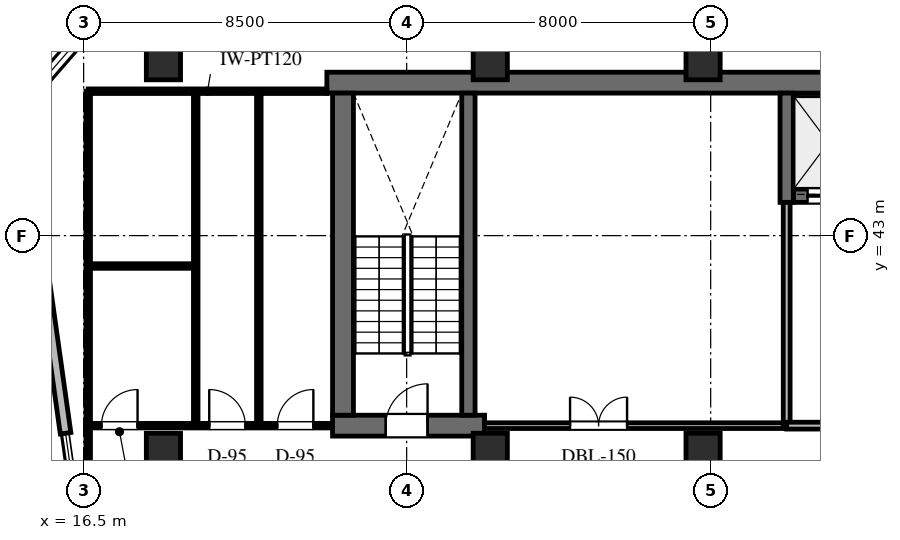
"""IFC4 building model, lengths in metres.
Left out: names, types, materials, properties, quantities, classifications, styles, units other than length and angle.
Written with IfcOpenShell. Run it as: python <this file> out.ifc"""

import sys

from ifc_helpers import new_model, si_unit, direction, frame, frame_2d, origin, origin_2d, place, context, subcontext, project, spatial, rectangle, extrude, element, fill, save


model = new_model("IFC4")
c1 = context("Model", 3, precision=1e-05, world=origin(), true_north=direction((0.0, 1.0)))
c2 = subcontext(c1, "Body", "Model", "MODEL_VIEW")
j1 = project(units=[si_unit("LENGTHUNIT", "METRE"), si_unit("PLANEANGLEUNIT", "RADIAN")], contexts=[c1])
p1 = place(None, origin())
s1 = spatial("IfcSite", under=j1, at=p1, CompositionType="ELEMENT")
p2 = place(p1, origin())
s2 = spatial("IfcBuilding", under=s1, at=p2, CompositionType="ELEMENT")
p3 = place(p2, frame((0.0, 0.0, 180.5)))
s3 = spatial("IfcBuildingStorey", under=s2, at=p3, CompositionType="ELEMENT", Elevation=180.5)
p4 = place(p3, frame((22.9, 47.025, 0.0), z_axis=(0.0, 0.0, 1.0), x_axis=(1.0, 0.0, 0.0)))
e1 = element("IfcWall", 1, at=p4, inside=s3, PredefinedType="SHEAR", context=c2, shape_type="SweptSolid", body=[
    extrude(rectangle(XDim=43.5, YDim=0.55, at=frame_2d((21.75, 0.0))), origin(), (0.0, 0.0, 1.0), 4.0),
])
p5 = place(p3, frame((35.175, 44.05, 0.0), z_axis=(0.0, 0.0, 1.0), x_axis=(1.0, 0.0, 0.0)))
e2 = element("IfcWall", 2, at=p5, inside=s3, PredefinedType="SHEAR", context=c2, shape_type="SweptSolid", body=[
    extrude(rectangle(XDim=9.7, YDim=0.35, at=frame_2d((4.85, 0.0))), origin(), (0.0, 0.0, 1.0), 4.0),
])
p6 = place(p5, frame((0.375, 0.0, 0.0)))
e3 = element("IfcOpeningElement", 3, at=p6, cuts=e2, PredefinedType="OPENING", context=c2, shape_type="SweptSolid", body=[
    extrude(rectangle(XDim=1.1, YDim=2.2, at=frame_2d((0.55, 1.1))), frame((0.0, 0.185, 0.0), z_axis=(0.0, -1.0, 0.0), x_axis=(1.0, 0.0, 0.0)), (0.0, 0.0, 1.0), 0.37),
])
p7 = place(p5, frame((2.375, 0.0, 0.0)))
e4 = element("IfcOpeningElement", 4, at=p7, cuts=e2, PredefinedType="OPENING", context=c2, shape_type="SweptSolid", body=[
    extrude(rectangle(XDim=1.1, YDim=2.2, at=frame_2d((0.55, 1.1))), frame((0.0, 0.185, 0.0), z_axis=(0.0, -1.0, 0.0), x_axis=(1.0, 0.0, 0.0)), (0.0, 0.0, 1.0), 0.37),
])
p8 = place(p5, frame((4.375, 0.0, 0.0)))
e5 = element("IfcOpeningElement", 5, at=p8, cuts=e2, PredefinedType="OPENING", context=c2, shape_type="SweptSolid", body=[
    extrude(rectangle(XDim=1.1, YDim=2.2, at=frame_2d((0.55, 1.1))), frame((0.0, 0.185, 0.0), z_axis=(0.0, -1.0, 0.0), x_axis=(1.0, 0.0, 0.0)), (0.0, 0.0, 1.0), 0.37),
])
p9 = place(p5, frame((6.375, 0.0, 0.0)))
e6 = element("IfcOpeningElement", 6, at=p9, cuts=e2, PredefinedType="OPENING", context=c2, shape_type="SweptSolid", body=[
    extrude(rectangle(XDim=1.1, YDim=2.2, at=frame_2d((0.55, 1.1))), frame((0.0, 0.185, 0.0), z_axis=(0.0, -1.0, 0.0), x_axis=(1.0, 0.0, 0.0)), (0.0, 0.0, 1.0), 0.37),
])
p10 = place(p3, frame((35.0, 43.875, 0.0), z_axis=(0.0, 0.0, 1.0), x_axis=(0.0, 1.0, 0.0)))
e7 = element("IfcWall", 7, at=p10, inside=s3, PredefinedType="SHEAR", context=c2, shape_type="SweptSolid", body=[
    extrude(rectangle(XDim=2.875, YDim=0.35, at=frame_2d((1.438, 0.0))), origin(), (0.0, 0.0, 1.0), 4.0),
])
p11 = place(p3, frame((23.05, 38.0, 0.0), z_axis=(0.0, 0.0, 1.0), x_axis=(1.0, 0.0, 0.0)))
e8 = element("IfcWall", 8, at=p11, inside=s3, PredefinedType="SHEAR", context=c2, shape_type="SweptSolid", body=[
    extrude(rectangle(XDim=4.0, YDim=0.55, at=frame_2d((2.0, 0.0))), origin(), (0.0, 0.0, 1.0), 4.0),
])
p12 = place(p11, frame((1.4, 0.0, 0.0)))
e9 = element("IfcOpeningElement", 9, at=p12, cuts=e8, PredefinedType="OPENING", context=c2, shape_type="SweptSolid", body=[
    extrude(rectangle(XDim=1.1, YDim=2.2, at=frame_2d((0.55, 1.1))), frame((0.0, 0.285, 0.0), z_axis=(0.0, -1.0, 0.0), x_axis=(1.0, 0.0, 0.0)), (0.0, 0.0, 1.0), 0.57),
])
p13 = place(p3, frame((23.325, 38.275, 0.0), z_axis=(0.0, 0.0, 1.0), x_axis=(0.0, 1.0, 0.0)))
e10 = element("IfcWall", 10, at=p13, inside=s3, PredefinedType="SHEAR", context=c2, shape_type="SweptSolid", body=[
    extrude(rectangle(XDim=8.475, YDim=0.55, at=frame_2d((4.238, 0.0))), origin(), (0.0, 0.0, 1.0), 4.0),
])
p14 = place(p3, frame((26.625, 38.275, 0.0), z_axis=(0.0, 0.0, 1.0), x_axis=(0.0, 1.0, 0.0)))
e11 = element("IfcWall", 11, at=p14, inside=s3, PredefinedType="SHEAR", context=c2, shape_type="SweptSolid", body=[
    extrude(rectangle(XDim=8.475, YDim=0.35, at=frame_2d((4.238, 0.0))), origin(), (0.0, 0.0, 1.0), 4.0),
])
for number, where, z_axis, x_axis in (
    (12, (32.8, 37.35, 0.0), (0.0, 0.0, 1.0), (1.0, 0.0, 0.0)),
    (13, (32.8, 47.55, 0.0), (0.0, 0.0, 1.0), (1.0, 0.0, 0.0)),
    (14, (27.2, 37.35, 0.0), (0.0, 0.0, 1.0), (1.0, 0.0, 0.0)),
    (15, (27.2, 47.55, 0.0), (0.0, 0.0, 1.0), (1.0, 0.0, 0.0)),
    (16, (18.6, 37.35, 0.0), (0.0, 0.0, 1.0), (1.0, 0.0, 0.0)),
    (17, (18.6, 47.55, 0.0), (0.0, 0.0, 1.0), (1.0, 0.0, 0.0)),
):
    element("IfcColumn", number, at=place(p3, frame(where, z_axis=z_axis, x_axis=x_axis)), inside=s3, PredefinedType="COLUMN", context=c2, shape_type="SweptSolid", body=[
        extrude(rectangle(XDim=0.9, YDim=0.9, at=origin_2d()), origin(), (0.0, 0.0, 1.0), 4.0),
    ])
p15 = place(p3, frame((16.025, 37.8, 0.0), z_axis=(0.0, 0.0, 1.0), x_axis=(-0.13918102754, 0.990266954701, 0.0)))
e18 = element("IfcWall", 18, at=p15, inside=s3, PredefinedType="STANDARD", context=c2, shape_type="SweptSolid", body=[
    extrude(rectangle(XDim=8.667, YDim=0.28, at=frame_2d((4.333, 0.0))), origin(), (0.0, 0.0, 1.0), 3.755),
])
p16 = place(p15, frame((3.374, 0.0, 0.65)))
e19 = element("IfcOpeningElement", 19, at=p16, cuts=e18, PredefinedType="OPENING", context=c2, shape_type="SweptSolid", body=[
    extrude(rectangle(XDim=1.8, YDim=2.1, at=frame_2d((0.9, 1.05))), frame((0.0, 0.15, 0.0), z_axis=(0.0, -1.0, 0.0), x_axis=(1.0, 0.0, 0.0)), (0.0, 0.0, 1.0), 0.3),
])
p17 = place(p3, frame((14.819, 46.383, 0.0), z_axis=(0.0, 0.0, 1.0), x_axis=(0.656071351282, 0.754698868442, 0.0)))
e20 = element("IfcWall", 20, at=p17, inside=s3, PredefinedType="STANDARD", context=c2, shape_type="SweptSolid", body=[
    extrude(rectangle(XDim=2.646, YDim=0.28, at=frame_2d((1.323, 0.0))), origin(), (0.0, 0.0, 1.0), 3.755),
])
p18 = place(p17, frame((0.416, 0.0, 0.65)))
e21 = element("IfcOpeningElement", 21, at=p18, cuts=e20, PredefinedType="OPENING", context=c2, shape_type="SweptSolid", body=[
    extrude(rectangle(XDim=1.8, YDim=2.1, at=frame_2d((0.9, 1.05))), frame((0.0, 0.15, 0.0), z_axis=(0.0, -1.0, 0.0), x_axis=(1.0, 0.0, 0.0)), (0.0, 0.0, 1.0), 0.3),
])
p19 = place(p3, frame((27.05, 38.0, 0.0), z_axis=(0.0, 0.0, 1.0), x_axis=(1.0, 0.0, 0.0)))
e22 = element("IfcWall", 22, at=p19, inside=s3, PredefinedType="PARTITIONING", context=c2, shape_type="SweptSolid", body=[
    extrude(rectangle(XDim=7.95, YDim=0.15, at=frame_2d((3.975, 0.0))), origin(), (0.0, 0.0, 1.0), 2.982),
])
p20 = place(p19, frame((2.25, 0.0, 0.0)))
e23 = element("IfcOpeningElement", 23, at=p20, cuts=e22, PredefinedType="OPENING", context=c2, shape_type="SweptSolid", body=[
    extrude(rectangle(XDim=1.5, YDim=2.2, at=frame_2d((0.75, 1.1))), frame((0.0, 0.085, 0.0), z_axis=(0.0, -1.0, 0.0), x_axis=(1.0, 0.0, 0.0)), (0.0, 0.0, 1.0), 0.17),
])
p21 = place(p3, frame((35.0, 38.0, 0.0), z_axis=(0.0, 0.0, 1.0), x_axis=(0.0, 1.0, 0.0)))
e24 = element("IfcWall", 24, at=p21, inside=s3, PredefinedType="STANDARD", context=c2, shape_type="SweptSolid", body=[
    extrude(rectangle(XDim=5.875, YDim=0.18, at=frame_2d((2.938, 0.0))), origin(), (0.0, 0.0, 1.0), 3.755),
])
p22 = place(p3, frame((35.0, 38.0, 0.0), z_axis=(0.0, 0.0, 1.0), x_axis=(1.0, 0.0, 0.0)))
e25 = element("IfcWall", 25, at=p22, inside=s3, PredefinedType="STANDARD", context=c2, shape_type="SweptSolid", body=[
    extrude(rectangle(XDim=10.05, YDim=0.18, at=frame_2d((5.025, 0.0))), origin(), (0.0, 0.0, 1.0), 2.982),
])
p23 = place(p22, frame((5.858, 0.0, 0.0)))
e26 = element("IfcOpeningElement", 26, at=p23, cuts=e25, PredefinedType="OPENING", context=c2, shape_type="SweptSolid", body=[
    extrude(rectangle(XDim=1.8, YDim=2.2, at=frame_2d((0.9, 1.1))), frame((0.0, 0.1, 0.0), z_axis=(0.0, -1.0, 0.0), x_axis=(1.0, 0.0, 0.0)), (0.0, 0.0, 1.0), 0.2),
])
p24 = place(p3, frame((16.62, 38.0, 0.0), z_axis=(0.0, 0.0, 1.0), x_axis=(1.0, 0.0, 0.0)))
e27 = element("IfcWall", 27, at=p24, inside=s3, PredefinedType="PARTITIONING", context=c2, shape_type="SweptSolid", body=[
    extrude(rectangle(XDim=6.43, YDim=0.12, at=frame_2d((3.215, 0.0))), origin(), (0.0, 0.0, 1.0), 2.982),
])
p25 = place(p24, frame((0.349, 0.0, 0.0)))
e28 = element("IfcOpeningElement", 28, at=p25, cuts=e27, PredefinedType="OPENING", context=c2, shape_type="SweptSolid", body=[
    extrude(rectangle(XDim=0.95, YDim=2.15, at=frame_2d((0.475, 1.075))), frame((0.0, 0.07, 0.0), z_axis=(0.0, -1.0, 0.0), x_axis=(1.0, 0.0, 0.0)), (0.0, 0.0, 1.0), 0.14),
])
p26 = place(p24, frame((3.185, 0.0, 0.0)))
e29 = element("IfcOpeningElement", 29, at=p26, cuts=e27, PredefinedType="OPENING", context=c2, shape_type="SweptSolid", body=[
    extrude(rectangle(XDim=0.95, YDim=2.15, at=frame_2d((0.475, 1.075))), frame((0.0, 0.07, 0.0), z_axis=(0.0, -1.0, 0.0), x_axis=(1.0, 0.0, 0.0)), (0.0, 0.0, 1.0), 0.14),
])
p27 = place(p24, frame((4.975, 0.0, 0.0)))
e30 = element("IfcOpeningElement", 30, at=p27, cuts=e27, PredefinedType="OPENING", context=c2, shape_type="SweptSolid", body=[
    extrude(rectangle(XDim=0.95, YDim=2.15, at=frame_2d((0.475, 1.075))), frame((0.0, 0.07, 0.0), z_axis=(0.0, -1.0, 0.0), x_axis=(1.0, 0.0, 0.0)), (0.0, 0.0, 1.0), 0.14),
])
p28 = place(p3, frame((16.62, 38.0, 0.0), z_axis=(0.0, 0.0, 1.0), x_axis=(0.0, 1.0, 0.0)))
e31 = element("IfcWall", 31, at=p28, inside=s3, PredefinedType="PARTITIONING", context=c2, shape_type="SweptSolid", body=[
    extrude(rectangle(XDim=8.8, YDim=0.12, at=frame_2d((4.4, 0.0))), origin(), (0.0, 0.0, 1.0), 3.755),
])
p29 = place(p3, frame((16.62, 46.8, 0.0), z_axis=(0.0, 0.0, 1.0), x_axis=(1.0, 0.0, 0.0)))
e32 = element("IfcWall", 32, at=p29, inside=s3, PredefinedType="PARTITIONING", context=c2, shape_type="SweptSolid", body=[
    extrude(rectangle(XDim=6.28, YDim=0.12, at=frame_2d((3.14, 0.0))), origin(), (0.0, 0.0, 1.0), 2.982),
])
for number, where, z_axis, x_axis in (
    (33, (19.45, 38.068, 0.0), (0.0, 0.0, 1.0), (0.0, 1.0, 0.0)),
    (34, (21.11, 38.068, 0.0), (0.0, 0.0, 1.0), (0.0, 1.0, 0.0)),
):
    element("IfcWall", number, at=place(p3, frame(where, z_axis=z_axis, x_axis=x_axis)), inside=s3, PredefinedType="PARTITIONING", context=c2, shape_type="SweptSolid", body=[
        extrude(rectangle(XDim=8.664, YDim=0.12, at=frame_2d((4.332, 0.0))), origin(), (0.0, 0.0, 1.0), 3.755),
    ])
p30 = place(p3, frame((16.688, 42.2, 0.0), z_axis=(0.0, 0.0, 1.0), x_axis=(1.0, 0.0, 0.0)))
e35 = element("IfcWall", 35, at=p30, inside=s3, PredefinedType="PARTITIONING", context=c2, shape_type="SweptSolid", body=[
    extrude(rectangle(XDim=2.694, YDim=0.12, at=frame_2d((1.347, 0.0))), origin(), (0.0, 0.0, 1.0), 2.982),
])
p31 = place(p3, frame((16.62, 34.4, 0.0), z_axis=(0.0, 0.0, 1.0), x_axis=(0.0, 1.0, 0.0)))
e36 = element("IfcWall", 36, at=p31, inside=s3, PredefinedType="PARTITIONING", context=c2, shape_type="SweptSolid", body=[
    extrude(rectangle(XDim=3.65, YDim=0.12, at=frame_2d((1.825, 0.0))), origin(), (0.0, 0.0, 1.0), 3.755),
])
p32 = place(p18, origin())
e37 = element("IfcWindow", 37, at=p32, inside=s3, PartitioningType="SINGLE_PANEL", PredefinedType="WINDOW", context=c2, shape_type="SweptSolid", body=[
    extrude(rectangle(XDim=1.8, YDim=2.1, at=frame_2d((0.9, 1.05))), frame((0.0, 0.03, 0.0), z_axis=(0.0, -1.0, 0.0), x_axis=(1.0, 0.0, 0.0)), (0.0, 0.0, 1.0), 0.06),
])
fill(e21, e37)
p33 = place(p12, origin())
e38 = element("IfcDoor", 38, at=p33, inside=s3, OperationType="SINGLE_SWING_RIGHT", PredefinedType="DOOR", context=c2, shape_type="SweptSolid", body=[
    extrude(rectangle(XDim=1.1, YDim=2.2, at=frame_2d((0.55, 1.1))), frame((0.0, 0.025, 0.0), z_axis=(0.0, -1.0, 0.0), x_axis=(1.0, 0.0, 0.0)), (0.0, 0.0, 1.0), 0.05),
])
fill(e9, e38)
p34 = place(p6, origin())
e39 = element("IfcDoor", 39, at=p34, inside=s3, OperationType="DOUBLE_DOOR_SLIDING", PredefinedType="DOOR", context=c2, shape_type="SweptSolid", body=[
    extrude(rectangle(XDim=1.1, YDim=2.2, at=frame_2d((0.55, 1.1))), frame((0.0, 0.025, 0.0), z_axis=(0.0, -1.0, 0.0), x_axis=(1.0, 0.0, 0.0)), (0.0, 0.0, 1.0), 0.05),
])
fill(e3, e39)
p35 = place(p20, origin())
e40 = element("IfcDoor", 40, at=p35, inside=s3, OperationType="DOUBLE_DOOR_SINGLE_SWING", PredefinedType="DOOR", context=c2, shape_type="SweptSolid", body=[
    extrude(rectangle(XDim=1.5, YDim=2.2, at=frame_2d((0.75, 1.1))), frame((0.0, 0.025, 0.0), z_axis=(0.0, -1.0, 0.0), x_axis=(1.0, 0.0, 0.0)), (0.0, 0.0, 1.0), 0.05),
])
fill(e23, e40)
p36 = place(p25, origin())
e41 = element("IfcDoor", 41, at=p36, inside=s3, OperationType="SINGLE_SWING_RIGHT", PredefinedType="DOOR", context=c2, shape_type="SweptSolid", body=[
    extrude(rectangle(XDim=0.95, YDim=2.15, at=frame_2d((0.475, 1.075))), frame((0.0, 0.025, 0.0), z_axis=(0.0, -1.0, 0.0), x_axis=(1.0, 0.0, 0.0)), (0.0, 0.0, 1.0), 0.05),
])
fill(e28, e41)
p37 = place(p26, origin())
e42 = element("IfcDoor", 42, at=p37, inside=s3, OperationType="SINGLE_SWING_LEFT", PredefinedType="DOOR", context=c2, shape_type="SweptSolid", body=[
    extrude(rectangle(XDim=0.95, YDim=2.15, at=frame_2d((0.475, 1.075))), frame((0.0, 0.025, 0.0), z_axis=(0.0, -1.0, 0.0), x_axis=(1.0, 0.0, 0.0)), (0.0, 0.0, 1.0), 0.05),
])
fill(e29, e42)
p38 = place(p27, origin())
e43 = element("IfcDoor", 43, at=p38, inside=s3, OperationType="SINGLE_SWING_RIGHT", PredefinedType="DOOR", context=c2, shape_type="SweptSolid", body=[
    extrude(rectangle(XDim=0.95, YDim=2.15, at=frame_2d((0.475, 1.075))), frame((0.0, 0.025, 0.0), z_axis=(0.0, -1.0, 0.0), x_axis=(1.0, 0.0, 0.0)), (0.0, 0.0, 1.0), 0.05),
])
fill(e30, e43)
save(model, sys.argv[1])
